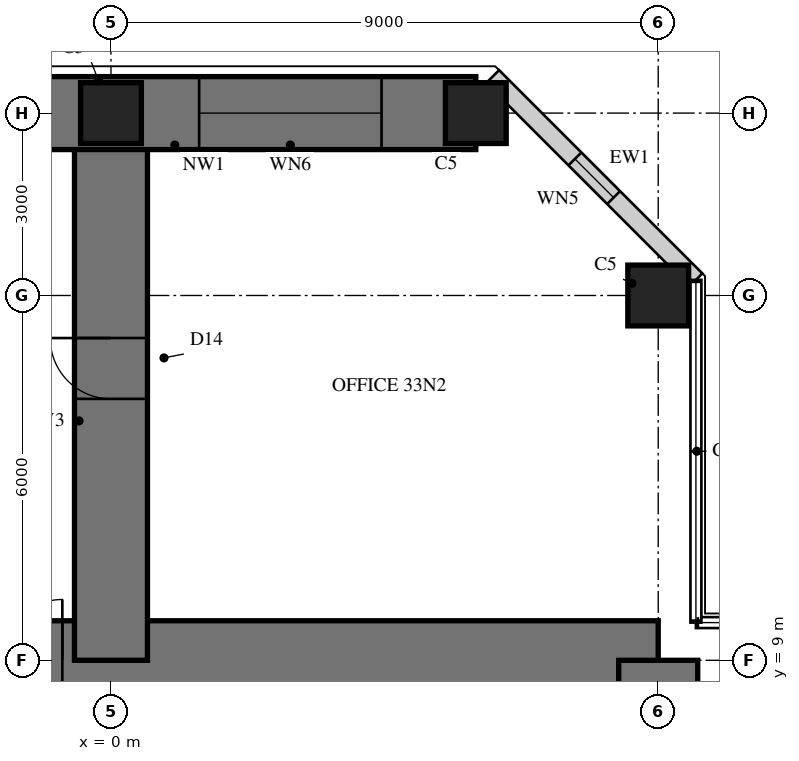
"""IFC4 building model, lengths in metres.
Left out: names, types, materials, properties, quantities, classifications, styles, units other than length and angle.
Written with IfcOpenShell. Run it as: python <this file> out.ifc"""

import sys

from ifc_helpers import new_model, si_unit, direction, frame, frame_2d, origin, origin_2d, place, context, subcontext, project, spatial, rectangle, hollow_rectangle, extrude, element, fill, save


model = new_model("IFC4")
c1 = context("Model", 3, precision=1e-05, world=origin(), true_north=direction((0.0, 1.0)))
c2 = subcontext(c1, "Body", "Model", "MODEL_VIEW")
j1 = project(units=[si_unit("LENGTHUNIT", "METRE"), si_unit("PLANEANGLEUNIT", "RADIAN")], contexts=[c1])
p1 = place(None, origin())
s1 = spatial("IfcSite", under=j1, at=p1, CompositionType="ELEMENT")
p2 = place(p1, origin())
s2 = spatial("IfcBuilding", under=s1, at=p2, CompositionType="ELEMENT")
p3 = place(p2, frame((0.0, 0.0, 136.5)))
s3 = spatial("IfcBuildingStorey", under=s2, at=p3, CompositionType="ELEMENT", Elevation=136.5)
p4 = place(p3, frame((9.0, 9.0, 0.0), z_axis=(0.0, 0.0, 1.0), x_axis=(-1.0, 0.0, 0.0)))
e1 = element("IfcWall", 1, at=p4, inside=s3, PredefinedType="SHEAR", context=c2, shape_type="SweptSolid", body=[
    extrude(rectangle(XDim=18.0, YDim=1.3, at=frame_2d((9.0, 0.0))), origin(), (0.0, 0.0, 1.0), 4.0),
])
p5 = place(p4, frame((9.8, 0.0, 0.0)))
e2 = element("IfcOpeningElement", 2, at=p5, cuts=e1, PredefinedType="OPENING", context=c2, shape_type="SweptSolid", body=[
    extrude(rectangle(XDim=1.0, YDim=2.4, at=frame_2d((0.5, 1.2))), frame((0.0, 0.66, 0.0), z_axis=(0.0, -1.0, 0.0), x_axis=(1.0, 0.0, 0.0)), (0.0, 0.0, 1.0), 1.32),
])
p6 = place(p3, frame((9.0, -9.0, 0.0), z_axis=(0.0, 0.0, 1.0), x_axis=(0.0, 1.0, 0.0)))
e3 = element("IfcWall", 3, at=p6, inside=s3, PredefinedType="SHEAR", context=c2, shape_type="SweptSolid", body=[
    extrude(rectangle(XDim=18.0, YDim=1.3, at=frame_2d((9.0, 0.0))), origin(), (0.0, 0.0, 1.0), 4.0),
])
p7 = place(p6, frame((9.8, 0.0, 0.0)))
e4 = element("IfcOpeningElement", 4, at=p7, cuts=e3, PredefinedType="OPENING", context=c2, shape_type="SweptSolid", body=[
    extrude(rectangle(XDim=1.0, YDim=2.4, at=frame_2d((0.5, 1.2))), frame((0.0, 0.66, 0.0), z_axis=(0.0, -1.0, 0.0), x_axis=(1.0, 0.0, 0.0)), (0.0, 0.0, 1.0), 1.32),
])
p8 = place(p3, frame((0.0, 9.0, 0.0), z_axis=(0.0, 0.0, 1.0), x_axis=(0.0, 1.0, 0.0)))
e5 = element("IfcWall", 5, at=p8, inside=s3, PredefinedType="SHEAR", context=c2, shape_type="SweptSolid", body=[
    extrude(rectangle(XDim=9.0, YDim=1.2, at=frame_2d((4.5, 0.0))), origin(), (0.0, 0.0, 1.0), 4.0),
])
p9 = place(p8, frame((4.3, 0.0, 0.0)))
e6 = element("IfcOpeningElement", 6, at=p9, cuts=e5, PredefinedType="OPENING", context=c2, shape_type="SweptSolid", body=[
    extrude(rectangle(XDim=1.0, YDim=2.2, at=frame_2d((0.5, 1.1))), frame((0.0, 0.61, 0.0), z_axis=(0.0, -1.0, 0.0), x_axis=(1.0, 0.0, 0.0)), (0.0, 0.0, 1.0), 1.22),
])
p10 = place(p3, frame((6.0, 18.0, 0.0), z_axis=(0.0, 0.0, 1.0), x_axis=(-1.0, 0.0, 0.0)))
e7 = element("IfcWall", 7, at=p10, inside=s3, PredefinedType="SHEAR", context=c2, shape_type="SweptSolid", body=[
    extrude(rectangle(XDim=12.0, YDim=1.2, at=frame_2d((6.0, 0.0))), origin(), (0.0, 0.0, 1.0), 4.0),
])
p11 = place(p10, frame((1.55, 0.0, 0.6)))
e8 = element("IfcOpeningElement", 8, at=p11, cuts=e7, PredefinedType="OPENING", context=c2, shape_type="SweptSolid", body=[
    extrude(rectangle(XDim=3.0, YDim=2.4, at=frame_2d((1.5, 1.2))), frame((0.0, 0.61, 0.0), z_axis=(0.0, -1.0, 0.0), x_axis=(1.0, 0.0, 0.0)), (0.0, 0.0, 1.0), 1.22),
])
p12 = place(p10, frame((7.45, 0.0, 0.6)))
e9 = element("IfcOpeningElement", 9, at=p12, cuts=e7, PredefinedType="OPENING", context=c2, shape_type="SweptSolid", body=[
    extrude(rectangle(XDim=3.0, YDim=2.4, at=frame_2d((1.5, 1.2))), frame((0.0, 0.61, 0.0), z_axis=(0.0, -1.0, 0.0), x_axis=(1.0, 0.0, 0.0)), (0.0, 0.0, 1.0), 1.22),
])
for number, where, z_axis, x_axis in (
    (10, (9.0, 15.0, 0.0), (0.0, 0.0, 1.0), (1.0, 0.0, 0.0)),
    (11, (6.0, 18.0, 0.0), (0.0, 0.0, 1.0), (1.0, 0.0, 0.0)),
    (12, (0.0, 18.0, 0.0), (0.0, 0.0, 1.0), (1.0, 0.0, 0.0)),
):
    element("IfcColumn", number, at=place(p3, frame(where, z_axis=z_axis, x_axis=x_axis)), inside=s3, PredefinedType="COLUMN", context=c2, shape_type="SweptSolid", body=[
        extrude(rectangle(XDim=1.0, YDim=1.0, at=origin_2d()), origin(), (0.0, 0.0, 1.0), 4.0),
    ])
p13 = place(p3, frame((9.62, 15.257, 0.0), z_axis=(0.0, 0.0, 1.0), x_axis=(-0.707106781187, 0.707106781187, 0.0)))
e13 = element("IfcWall", 13, at=p13, inside=s3, PredefinedType="SOLIDWALL", context=c2, shape_type="SweptSolid", body=[
    extrude(rectangle(XDim=4.728, YDim=0.3, at=frame_2d((2.364, 0.0))), origin(), (0.0, 0.0, 1.0), 3.8),
])
p14 = place(p13, frame((1.914, 0.0, 0.3)))
e14 = element("IfcOpeningElement", 14, at=p14, cuts=e13, PredefinedType="OPENING", context=c2, shape_type="SweptSolid", body=[
    extrude(rectangle(XDim=0.9, YDim=2.4, at=frame_2d((0.45, 1.2))), frame((0.0, 0.16, 0.0), z_axis=(0.0, -1.0, 0.0), x_axis=(1.0, 0.0, 0.0)), (0.0, 0.0, 1.0), 0.32),
])
p15 = place(p14, origin())
e15 = element("IfcWindow", 15, at=p15, inside=s3, PartitioningType="SINGLE_PANEL", PredefinedType="WINDOW", context=c2, shape_type="SweptSolid", body=[
    extrude(hollow_rectangle(XDim=0.9, YDim=2.4, WallThickness=0.06, at=frame_2d((0.45, 1.2))), frame((0.0, 0.03, 0.0), z_axis=(0.0, -1.0, 0.0), x_axis=(1.0, 0.0, 0.0)), (0.0, 0.0, 1.0), 0.06),
    extrude(rectangle(XDim=0.779, YDim=2.279, at=frame_2d((0.45, 1.2))), frame((0.0, 0.03, 0.0), z_axis=(0.0, -1.0, 0.0), x_axis=(1.0, 0.0, 0.0)), (0.0, 0.0, 1.0), 0.06),
])
fill(e14, e15)
p16 = place(p11, origin())
e16 = element("IfcWindow", 16, at=p16, inside=s3, PartitioningType="SINGLE_PANEL", PredefinedType="WINDOW", context=c2, shape_type="SweptSolid", body=[
    extrude(hollow_rectangle(XDim=3.0, YDim=2.4, WallThickness=0.06, at=frame_2d((1.5, 1.2))), frame((0.0, 0.03, 0.0), z_axis=(0.0, -1.0, 0.0), x_axis=(1.0, 0.0, 0.0)), (0.0, 0.0, 1.0), 0.06),
    extrude(rectangle(XDim=2.879, YDim=2.279, at=frame_2d((1.5, 1.2))), frame((0.0, 0.03, 0.0), z_axis=(0.0, -1.0, 0.0), x_axis=(1.0, 0.0, 0.0)), (0.0, 0.0, 1.0), 0.06),
])
fill(e8, e16)
p17 = place(p9, origin())
e17 = element("IfcDoor", 17, at=p17, inside=s3, OperationType="SINGLE_SWING_RIGHT", PredefinedType="DOOR", context=c2, shape_type="SweptSolid", body=[
    extrude(rectangle(XDim=1.0, YDim=2.2, at=frame_2d((0.5, 1.1))), frame((0.0, 0.025, 0.0), z_axis=(0.0, -1.0, 0.0), x_axis=(1.0, 0.0, 0.0)), (0.0, 0.0, 1.0), 0.05),
])
fill(e6, e17)
p18 = place(p5, frame((1.0, 0.0, 0.0), z_axis=(0.0, 0.0, 1.0), x_axis=(-1.0, 0.0, 0.0)))
e18 = element("IfcDoor", 18, at=p18, inside=s3, OperationType="SINGLE_SWING_RIGHT", PredefinedType="DOOR", context=c2, shape_type="SweptSolid", body=[
    extrude(rectangle(XDim=1.0, YDim=2.4, at=frame_2d((0.5, 1.2))), frame((0.0, -0.005, 0.0), z_axis=(0.0, -1.0, 0.0), x_axis=(1.0, 0.0, 0.0)), (0.0, 0.0, 1.0), 0.05),
])
fill(e2, e18)
save(model, sys.argv[1])
